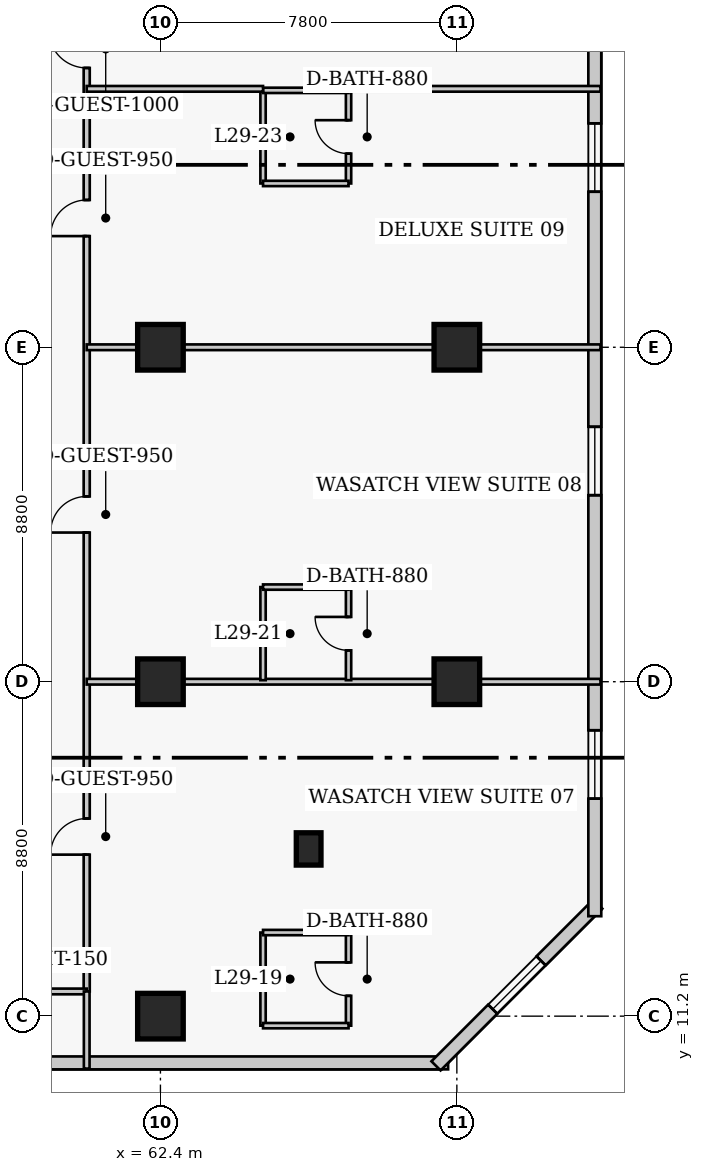
"""IFC4 building model, lengths in metres.
Left out: names, types, materials, properties, quantities, classifications, styles, units other than length and angle.
Written with IfcOpenShell. Run it as: python <this file> out.ifc"""

import sys

from ifc_helpers import new_model, si_unit, direction, frame, frame_2d, origin, origin_2d, place, context, subcontext, project, spatial, rectangle, extrude, element, fill, save


model = new_model("IFC4")
c1 = context("Model", 3, precision=1e-05, world=origin(), true_north=direction((0.0, 1.0)))
c2 = subcontext(c1, "Body", "Model", "MODEL_VIEW")
j1 = project(units=[si_unit("LENGTHUNIT", "METRE"), si_unit("PLANEANGLEUNIT", "RADIAN")], contexts=[c1])
p1 = place(None, origin())
s1 = spatial("IfcSite", under=j1, at=p1, CompositionType="ELEMENT")
p2 = place(p1, origin())
s2 = spatial("IfcBuilding", under=s1, at=p2, CompositionType="ELEMENT")
p3 = place(p2, frame((0.0, 0.0, 118.4)))
s3 = spatial("IfcBuildingStorey", under=s2, at=p3, CompositionType="ELEMENT", Elevation=118.4)
for number, where, z_axis, x_axis in (
    (1, (62.4, 11.2, 0.0), (0.0, 0.0, 1.0), (1.0, 0.0, 0.0)),
    (2, (62.4, 20.0, 0.0), (0.0, 0.0, 1.0), (1.0, 0.0, 0.0)),
    (3, (62.4, 28.8, 0.0), (0.0, 0.0, 1.0), (1.0, 0.0, 0.0)),
    (4, (70.2, 20.0, 0.0), (0.0, 0.0, 1.0), (1.0, 0.0, 0.0)),
    (5, (70.2, 28.8, 0.0), (0.0, 0.0, 1.0), (1.0, 0.0, 0.0)),
):
    element("IfcColumn", number, at=place(p3, frame(where, z_axis=z_axis, x_axis=x_axis)), inside=s3, PredefinedType="COLUMN", context=c2, shape_type="SweptSolid", body=[
        extrude(rectangle(XDim=1.2, YDim=1.2, at=origin_2d()), origin(), (0.0, 0.0, 1.0), 3.8),
    ])
p4 = place(p3, frame((66.3, 15.6, 0.0), z_axis=(0.0, 0.0, 1.0), x_axis=(1.0, 0.0, 0.0)))
e6 = element("IfcColumn", 6, at=p4, inside=s3, PredefinedType="PILASTER", context=c2, shape_type="SweptSolid", body=[
    extrude(rectangle(XDim=0.65, YDim=0.85, at=origin_2d()), origin(), (0.0, 0.0, 1.0), 3.8),
])
p5 = place(p3, frame((41.68, 9.97, 0.0), z_axis=(0.0, 0.0, 1.0), x_axis=(1.0, 0.0, 0.0)))
e7 = element("IfcWall", 7, at=p5, inside=s3, PredefinedType="SOLIDWALL", context=c2, shape_type="SweptSolid", body=[
    extrude(rectangle(XDim=28.29, YDim=0.34, at=frame_2d((14.145, 0.0))), origin(), (0.0, 0.0, 1.0), 3.54),
])
p6 = place(p5, frame((8.32, 0.0, 0.0)))
e8 = element("IfcOpeningElement", 8, at=p6, cuts=e7, PredefinedType="OPENING", context=c2, shape_type="SweptSolid", body=[
    extrude(rectangle(XDim=1.4, YDim=2.15, at=frame_2d((0.7, 1.075))), frame((0.0, 0.18, 0.0), z_axis=(0.0, -1.0, 0.0), x_axis=(1.0, 0.0, 0.0)), (0.0, 0.0, 1.0), 0.36),
])
p7 = place(p5, frame((2.665, 0.0, 0.85)))
e9 = element("IfcOpeningElement", 9, at=p7, cuts=e7, PredefinedType="OPENING", context=c2, shape_type="SweptSolid", body=[
    extrude(rectangle(XDim=1.8, YDim=1.8, at=frame_2d((0.9, 0.9))), frame((0.0, 0.18, 0.0), z_axis=(0.0, -1.0, 0.0), x_axis=(1.0, 0.0, 0.0)), (0.0, 0.0, 1.0), 0.36),
])
p8 = place(p5, frame((13.895, 0.0, 0.85)))
e10 = element("IfcOpeningElement", 10, at=p8, cuts=e7, PredefinedType="OPENING", context=c2, shape_type="SweptSolid", body=[
    extrude(rectangle(XDim=1.8, YDim=1.8, at=frame_2d((0.9, 0.9))), frame((0.0, 0.18, 0.0), z_axis=(0.0, -1.0, 0.0), x_axis=(1.0, 0.0, 0.0)), (0.0, 0.0, 1.0), 0.36),
])
p9 = place(p3, frame((69.652, 9.892, 0.0), z_axis=(0.0, 0.0, 1.0), x_axis=(0.707106781187, 0.707106781187, 0.0)))
e11 = element("IfcWall", 11, at=p9, inside=s3, PredefinedType="SOLIDWALL", context=c2, shape_type="SweptSolid", body=[
    extrude(rectangle(XDim=6.02, YDim=0.34, at=frame_2d((3.01, 0.0))), origin(), (0.0, 0.0, 1.0), 3.54),
])
p10 = place(p9, frame((2.11, 0.0, 0.85)))
e12 = element("IfcOpeningElement", 12, at=p10, cuts=e11, PredefinedType="OPENING", context=c2, shape_type="SweptSolid", body=[
    extrude(rectangle(XDim=1.8, YDim=1.8, at=frame_2d((0.9, 0.9))), frame((0.0, 0.18, 0.0), z_axis=(0.0, -1.0, 0.0), x_axis=(1.0, 0.0, 0.0)), (0.0, 0.0, 1.0), 0.36),
])
p11 = place(p3, frame((73.83, 13.83, 0.0), z_axis=(0.0, 0.0, 1.0), x_axis=(0.0, 1.0, 0.0)))
e13 = element("IfcWall", 13, at=p11, inside=s3, PredefinedType="SOLIDWALL", context=c2, shape_type="SweptSolid", body=[
    extrude(rectangle(XDim=31.94, YDim=0.34, at=frame_2d((15.97, 0.0))), origin(), (0.0, 0.0, 1.0), 3.54),
])
p12 = place(p11, frame((3.093, 0.0, 0.85)))
e14 = element("IfcOpeningElement", 14, at=p12, cuts=e13, PredefinedType="OPENING", context=c2, shape_type="SweptSolid", body=[
    extrude(rectangle(XDim=1.8, YDim=1.8, at=frame_2d((0.9, 0.9))), frame((0.0, 0.18, 0.0), z_axis=(0.0, -1.0, 0.0), x_axis=(1.0, 0.0, 0.0)), (0.0, 0.0, 1.0), 0.36),
])
p13 = place(p11, frame((11.077, 0.0, 0.85)))
e15 = element("IfcOpeningElement", 15, at=p13, cuts=e13, PredefinedType="OPENING", context=c2, shape_type="SweptSolid", body=[
    extrude(rectangle(XDim=1.8, YDim=1.8, at=frame_2d((0.9, 0.9))), frame((0.0, 0.18, 0.0), z_axis=(0.0, -1.0, 0.0), x_axis=(1.0, 0.0, 0.0)), (0.0, 0.0, 1.0), 0.36),
])
p14 = place(p11, frame((19.062, 0.0, 0.85)))
e16 = element("IfcOpeningElement", 16, at=p14, cuts=e13, PredefinedType="OPENING", context=c2, shape_type="SweptSolid", body=[
    extrude(rectangle(XDim=1.8, YDim=1.8, at=frame_2d((0.9, 0.9))), frame((0.0, 0.18, 0.0), z_axis=(0.0, -1.0, 0.0), x_axis=(1.0, 0.0, 0.0)), (0.0, 0.0, 1.0), 0.36),
])
p15 = place(p11, frame((27.048, 0.0, 0.85)))
e17 = element("IfcOpeningElement", 17, at=p15, cuts=e13, PredefinedType="OPENING", context=c2, shape_type="SweptSolid", body=[
    extrude(rectangle(XDim=1.8, YDim=1.8, at=frame_2d((0.9, 0.9))), frame((0.0, 0.18, 0.0), z_axis=(0.0, -1.0, 0.0), x_axis=(1.0, 0.0, 0.0)), (0.0, 0.0, 1.0), 0.36),
])
p16 = place(p3, frame((60.46, 11.85, 0.0), z_axis=(0.0, 0.0, 1.0), x_axis=(0.0, 1.0, 0.0)))
e18 = element("IfcWall", 18, at=p16, inside=s3, PredefinedType="PARTITIONING", context=c2, shape_type="SweptSolid", body=[
    extrude(rectangle(XDim=28.8, YDim=0.16, at=frame_2d((14.4, 0.0))), origin(), (0.0, 0.0, 1.0), 3.54),
])
p17 = place(p16, frame((3.6, 0.0, 0.0)))
e19 = element("IfcOpeningElement", 19, at=p17, cuts=e18, PredefinedType="OPENING", context=c2, shape_type="SweptSolid", body=[
    extrude(rectangle(XDim=0.95, YDim=2.1, at=frame_2d((0.475, 1.05))), frame((0.0, 0.09, 0.0), z_axis=(0.0, -1.0, 0.0), x_axis=(1.0, 0.0, 0.0)), (0.0, 0.0, 1.0), 0.18),
])
p18 = place(p16, frame((12.075, 0.0, 0.0)))
e20 = element("IfcOpeningElement", 20, at=p18, cuts=e18, PredefinedType="OPENING", context=c2, shape_type="SweptSolid", body=[
    extrude(rectangle(XDim=0.95, YDim=2.1, at=frame_2d((0.475, 1.05))), frame((0.0, 0.09, 0.0), z_axis=(0.0, -1.0, 0.0), x_axis=(1.0, 0.0, 0.0)), (0.0, 0.0, 1.0), 0.18),
])
p19 = place(p16, frame((19.875, 0.0, 0.0)))
e21 = element("IfcOpeningElement", 21, at=p19, cuts=e18, PredefinedType="OPENING", context=c2, shape_type="SweptSolid", body=[
    extrude(rectangle(XDim=0.95, YDim=2.1, at=frame_2d((0.475, 1.05))), frame((0.0, 0.09, 0.0), z_axis=(0.0, -1.0, 0.0), x_axis=(1.0, 0.0, 0.0)), (0.0, 0.0, 1.0), 0.18),
])
p20 = place(p16, frame((24.3, 0.0, 0.0)))
e22 = element("IfcOpeningElement", 22, at=p20, cuts=e18, PredefinedType="OPENING", context=c2, shape_type="SweptSolid", body=[
    extrude(rectangle(XDim=1.0, YDim=2.15, at=frame_2d((0.5, 1.075))), frame((0.0, 0.09, 0.0), z_axis=(0.0, -1.0, 0.0), x_axis=(1.0, 0.0, 0.0)), (0.0, 0.0, 1.0), 0.18),
])
p21 = place(p3, frame((58.24, 11.85, 0.0), z_axis=(0.0, 0.0, 1.0), x_axis=(1.0, 0.0, 0.0)))
e23 = element("IfcWall", 23, at=p21, inside=s3, PredefinedType="PARTITIONING", context=c2, shape_type="SweptSolid", body=[
    extrude(rectangle(XDim=2.22, YDim=0.15, at=frame_2d((1.11, 0.0))), origin(), (0.0, 0.0, 1.0), 3.54),
])
p22 = place(p3, frame((60.46, 9.82, 0.0), z_axis=(0.0, 0.0, 1.0), x_axis=(0.0, 1.0, 0.0)))
e24 = element("IfcWall", 24, at=p22, inside=s3, PredefinedType="PARTITIONING", context=c2, shape_type="SweptSolid", body=[
    extrude(rectangle(XDim=2.03, YDim=0.15, at=frame_2d((1.015, 0.0))), origin(), (0.0, 0.0, 1.0), 3.54),
])
p23 = place(p3, frame((65.1, 10.95, 0.0), z_axis=(0.0, 0.0, 1.0), x_axis=(0.0, 1.0, 0.0)))
e25 = element("IfcWall", 25, at=p23, inside=s3, PredefinedType="PLUMBINGWALL", context=c2, shape_type="SweptSolid", body=[
    extrude(rectangle(XDim=2.45, YDim=0.14, at=frame_2d((1.225, 0.0))), origin(), (0.0, 0.0, 1.0), 3.54),
])
p24 = place(p3, frame((67.35, 10.95, 0.0), z_axis=(0.0, 0.0, 1.0), x_axis=(0.0, 1.0, 0.0)))
e26 = element("IfcWall", 26, at=p24, inside=s3, PredefinedType="PLUMBINGWALL", context=c2, shape_type="SweptSolid", body=[
    extrude(rectangle(XDim=2.45, YDim=0.14, at=frame_2d((1.225, 0.0))), origin(), (0.0, 0.0, 1.0), 3.54),
])
p25 = place(p24, frame((0.785, 0.0, 0.0)))
e27 = element("IfcOpeningElement", 27, at=p25, cuts=e26, PredefinedType="OPENING", context=c2, shape_type="SweptSolid", body=[
    extrude(rectangle(XDim=0.88, YDim=2.05, at=frame_2d((0.44, 1.025))), frame((0.0, 0.08, 0.0), z_axis=(0.0, -1.0, 0.0), x_axis=(1.0, 0.0, 0.0)), (0.0, 0.0, 1.0), 0.16),
])
for number, where, z_axis, x_axis in (
    (28, (65.1, 10.95, 0.0), (0.0, 0.0, 1.0), (1.0, 0.0, 0.0)),
    (29, (65.1, 13.4, 0.0), (0.0, 0.0, 1.0), (1.0, 0.0, 0.0)),
):
    element("IfcWall", number, at=place(p3, frame(where, z_axis=z_axis, x_axis=x_axis)), inside=s3, PredefinedType="PLUMBINGWALL", context=c2, shape_type="SweptSolid", body=[
        extrude(rectangle(XDim=2.25, YDim=0.14, at=frame_2d((1.125, 0.0))), origin(), (0.0, 0.0, 1.0), 3.54),
    ])
p26 = place(p3, frame((60.46, 20.0, 0.0), z_axis=(0.0, 0.0, 1.0), x_axis=(1.0, 0.0, 0.0)))
e30 = element("IfcWall", 30, at=p26, inside=s3, PredefinedType="PARTITIONING", context=c2, shape_type="SweptSolid", body=[
    extrude(rectangle(XDim=13.52, YDim=0.15, at=frame_2d((6.76, 0.0))), origin(), (0.0, 0.0, 1.0), 2.679),
])
p27 = place(p3, frame((65.1, 20.04, 0.0), z_axis=(0.0, 0.0, 1.0), x_axis=(0.0, 1.0, 0.0)))
e31 = element("IfcWall", 31, at=p27, inside=s3, PredefinedType="PLUMBINGWALL", context=c2, shape_type="SweptSolid", body=[
    extrude(rectangle(XDim=2.45, YDim=0.14, at=frame_2d((1.225, 0.0))), origin(), (0.0, 0.0, 1.0), 3.54),
])
p28 = place(p3, frame((67.35, 20.04, 0.0), z_axis=(0.0, 0.0, 1.0), x_axis=(0.0, 1.0, 0.0)))
e32 = element("IfcWall", 32, at=p28, inside=s3, PredefinedType="PLUMBINGWALL", context=c2, shape_type="SweptSolid", body=[
    extrude(rectangle(XDim=2.45, YDim=0.14, at=frame_2d((1.225, 0.0))), origin(), (0.0, 0.0, 1.0), 3.54),
])
p29 = place(p28, frame((0.785, 0.0, 0.0)))
e33 = element("IfcOpeningElement", 33, at=p29, cuts=e32, PredefinedType="OPENING", context=c2, shape_type="SweptSolid", body=[
    extrude(rectangle(XDim=0.88, YDim=2.05, at=frame_2d((0.44, 1.025))), frame((0.0, 0.08, 0.0), z_axis=(0.0, -1.0, 0.0), x_axis=(1.0, 0.0, 0.0)), (0.0, 0.0, 1.0), 0.16),
])
p30 = place(p3, frame((65.1, 22.49, 0.0), z_axis=(0.0, 0.0, 1.0), x_axis=(1.0, 0.0, 0.0)))
e34 = element("IfcWall", 34, at=p30, inside=s3, PredefinedType="PLUMBINGWALL", context=c2, shape_type="SweptSolid", body=[
    extrude(rectangle(XDim=2.25, YDim=0.14, at=frame_2d((1.125, 0.0))), origin(), (0.0, 0.0, 1.0), 3.54),
])
p31 = place(p3, frame((60.46, 28.8, 0.0), z_axis=(0.0, 0.0, 1.0), x_axis=(1.0, 0.0, 0.0)))
e35 = element("IfcWall", 35, at=p31, inside=s3, PredefinedType="PARTITIONING", context=c2, shape_type="SweptSolid", body=[
    extrude(rectangle(XDim=13.52, YDim=0.15, at=frame_2d((6.76, 0.0))), origin(), (0.0, 0.0, 1.0), 2.679),
])
p32 = place(p3, frame((65.1, 33.11, 0.0), z_axis=(0.0, 0.0, 1.0), x_axis=(0.0, 1.0, 0.0)))
e36 = element("IfcWall", 36, at=p32, inside=s3, PredefinedType="PLUMBINGWALL", context=c2, shape_type="SweptSolid", body=[
    extrude(rectangle(XDim=2.45, YDim=0.14, at=frame_2d((1.225, 0.0))), origin(), (0.0, 0.0, 1.0), 3.54),
])
p33 = place(p3, frame((67.35, 33.11, 0.0), z_axis=(0.0, 0.0, 1.0), x_axis=(0.0, 1.0, 0.0)))
e37 = element("IfcWall", 37, at=p33, inside=s3, PredefinedType="PLUMBINGWALL", context=c2, shape_type="SweptSolid", body=[
    extrude(rectangle(XDim=2.45, YDim=0.14, at=frame_2d((1.225, 0.0))), origin(), (0.0, 0.0, 1.0), 3.54),
])
p34 = place(p33, frame((0.785, 0.0, 0.0)))
e38 = element("IfcOpeningElement", 38, at=p34, cuts=e37, PredefinedType="OPENING", context=c2, shape_type="SweptSolid", body=[
    extrude(rectangle(XDim=0.88, YDim=2.05, at=frame_2d((0.44, 1.025))), frame((0.0, 0.08, 0.0), z_axis=(0.0, -1.0, 0.0), x_axis=(1.0, 0.0, 0.0)), (0.0, 0.0, 1.0), 0.16),
])
for number, where, z_axis, x_axis in (
    (39, (65.1, 33.11, 0.0), (0.0, 0.0, 1.0), (1.0, 0.0, 0.0)),
    (40, (65.1, 35.56, 0.0), (0.0, 0.0, 1.0), (1.0, 0.0, 0.0)),
):
    element("IfcWall", number, at=place(p3, frame(where, z_axis=z_axis, x_axis=x_axis)), inside=s3, PredefinedType="PLUMBINGWALL", context=c2, shape_type="SweptSolid", body=[
        extrude(rectangle(XDim=2.25, YDim=0.14, at=frame_2d((1.125, 0.0))), origin(), (0.0, 0.0, 1.0), 3.54),
    ])
p35 = place(p3, frame((60.46, 35.6, 0.0), z_axis=(0.0, 0.0, 1.0), x_axis=(1.0, 0.0, 0.0)))
e41 = element("IfcWall", 41, at=p35, inside=s3, PredefinedType="PARTITIONING", context=c2, shape_type="SweptSolid", body=[
    extrude(rectangle(XDim=4.64, YDim=0.15, at=frame_2d((2.32, 0.0))), origin(), (0.0, 0.0, 1.0), 3.54),
])
p36 = place(p3, frame((67.35, 35.6, 0.0), z_axis=(0.0, 0.0, 1.0), x_axis=(1.0, 0.0, 0.0)))
e42 = element("IfcWall", 42, at=p36, inside=s3, PredefinedType="PARTITIONING", context=c2, shape_type="SweptSolid", body=[
    extrude(rectangle(XDim=6.63, YDim=0.15, at=frame_2d((3.315, 0.0))), origin(), (0.0, 0.0, 1.0), 3.54),
])
p37 = place(p10, origin())
e43 = element("IfcWindow", 43, at=p37, inside=s3, PartitioningType="SINGLE_PANEL", PredefinedType="WINDOW", context=c2, shape_type="SweptSolid", body=[
    extrude(rectangle(XDim=1.8, YDim=1.8, at=frame_2d((0.9, 0.9))), frame((0.0, 0.03, 0.0), z_axis=(0.0, -1.0, 0.0), x_axis=(1.0, 0.0, 0.0)), (0.0, 0.0, 1.0), 0.06),
])
fill(e12, e43)
p38 = place(p12, origin())
e44 = element("IfcWindow", 44, at=p38, inside=s3, PartitioningType="SINGLE_PANEL", PredefinedType="WINDOW", context=c2, shape_type="SweptSolid", body=[
    extrude(rectangle(XDim=1.8, YDim=1.8, at=frame_2d((0.9, 0.9))), frame((0.0, 0.03, 0.0), z_axis=(0.0, -1.0, 0.0), x_axis=(1.0, 0.0, 0.0)), (0.0, 0.0, 1.0), 0.06),
])
fill(e14, e44)
p39 = place(p13, origin())
e45 = element("IfcWindow", 45, at=p39, inside=s3, PartitioningType="SINGLE_PANEL", PredefinedType="WINDOW", context=c2, shape_type="SweptSolid", body=[
    extrude(rectangle(XDim=1.8, YDim=1.8, at=frame_2d((0.9, 0.9))), frame((0.0, 0.03, 0.0), z_axis=(0.0, -1.0, 0.0), x_axis=(1.0, 0.0, 0.0)), (0.0, 0.0, 1.0), 0.06),
])
fill(e15, e45)
p40 = place(p14, origin())
e46 = element("IfcWindow", 46, at=p40, inside=s3, PartitioningType="SINGLE_PANEL", PredefinedType="WINDOW", context=c2, shape_type="SweptSolid", body=[
    extrude(rectangle(XDim=1.8, YDim=1.8, at=frame_2d((0.9, 0.9))), frame((0.0, 0.03, 0.0), z_axis=(0.0, -1.0, 0.0), x_axis=(1.0, 0.0, 0.0)), (0.0, 0.0, 1.0), 0.06),
])
fill(e16, e46)
p41 = place(p25, origin())
e47 = element("IfcDoor", 47, at=p41, inside=s3, OperationType="SINGLE_SWING_RIGHT", PredefinedType="DOOR", context=c2, shape_type="SweptSolid", body=[
    extrude(rectangle(XDim=0.88, YDim=2.05, at=frame_2d((0.44, 1.025))), frame((0.0, 0.025, 0.0), z_axis=(0.0, -1.0, 0.0), x_axis=(1.0, 0.0, 0.0)), (0.0, 0.0, 1.0), 0.05),
])
fill(e27, e47)
p42 = place(p17, origin())
e48 = element("IfcDoor", 48, at=p42, inside=s3, OperationType="SINGLE_SWING_LEFT", PredefinedType="DOOR", context=c2, shape_type="SweptSolid", body=[
    extrude(rectangle(XDim=0.95, YDim=2.1, at=frame_2d((0.475, 1.05))), frame((0.0, 0.025, 0.0), z_axis=(0.0, -1.0, 0.0), x_axis=(1.0, 0.0, 0.0)), (0.0, 0.0, 1.0), 0.05),
])
fill(e19, e48)
p43 = place(p29, origin())
e49 = element("IfcDoor", 49, at=p43, inside=s3, OperationType="SINGLE_SWING_RIGHT", PredefinedType="DOOR", context=c2, shape_type="SweptSolid", body=[
    extrude(rectangle(XDim=0.88, YDim=2.05, at=frame_2d((0.44, 1.025))), frame((0.0, 0.025, 0.0), z_axis=(0.0, -1.0, 0.0), x_axis=(1.0, 0.0, 0.0)), (0.0, 0.0, 1.0), 0.05),
])
fill(e33, e49)
p44 = place(p18, origin())
e50 = element("IfcDoor", 50, at=p44, inside=s3, OperationType="SINGLE_SWING_LEFT", PredefinedType="DOOR", context=c2, shape_type="SweptSolid", body=[
    extrude(rectangle(XDim=0.95, YDim=2.1, at=frame_2d((0.475, 1.05))), frame((0.0, 0.025, 0.0), z_axis=(0.0, -1.0, 0.0), x_axis=(1.0, 0.0, 0.0)), (0.0, 0.0, 1.0), 0.05),
])
fill(e20, e50)
p45 = place(p34, origin())
e51 = element("IfcDoor", 51, at=p45, inside=s3, OperationType="SINGLE_SWING_RIGHT", PredefinedType="DOOR", context=c2, shape_type="SweptSolid", body=[
    extrude(rectangle(XDim=0.88, YDim=2.05, at=frame_2d((0.44, 1.025))), frame((0.0, 0.025, 0.0), z_axis=(0.0, -1.0, 0.0), x_axis=(1.0, 0.0, 0.0)), (0.0, 0.0, 1.0), 0.05),
])
fill(e38, e51)
p46 = place(p19, origin())
e52 = element("IfcDoor", 52, at=p46, inside=s3, OperationType="SINGLE_SWING_LEFT", PredefinedType="DOOR", context=c2, shape_type="SweptSolid", body=[
    extrude(rectangle(XDim=0.95, YDim=2.1, at=frame_2d((0.475, 1.05))), frame((0.0, 0.025, 0.0), z_axis=(0.0, -1.0, 0.0), x_axis=(1.0, 0.0, 0.0)), (0.0, 0.0, 1.0), 0.05),
])
fill(e21, e52)
p47 = place(p20, origin())
e53 = element("IfcDoor", 53, at=p47, inside=s3, OperationType="SINGLE_SWING_RIGHT", PredefinedType="DOOR", context=c2, shape_type="SweptSolid", body=[
    extrude(rectangle(XDim=1.0, YDim=2.15, at=frame_2d((0.5, 1.075))), frame((0.0, 0.025, 0.0), z_axis=(0.0, -1.0, 0.0), x_axis=(1.0, 0.0, 0.0)), (0.0, 0.0, 1.0), 0.05),
])
fill(e22, e53)
save(model, sys.argv[1])
